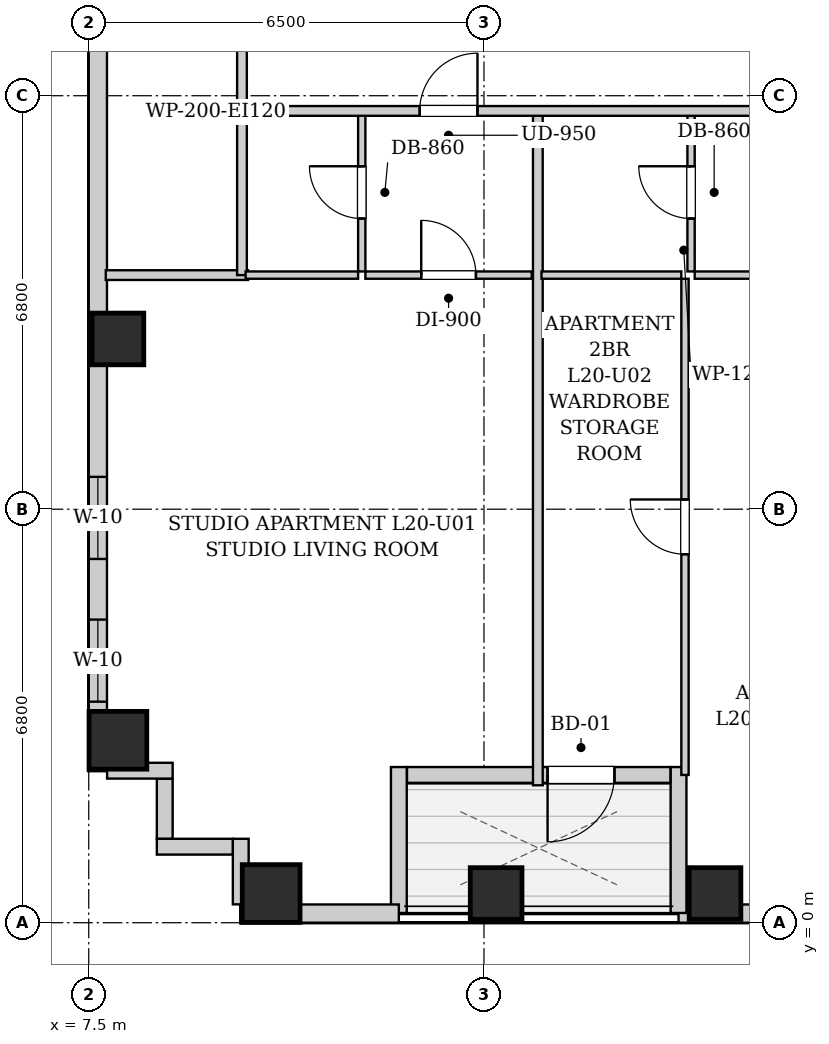
"""IFC4 building model, lengths in metres.
Left out: names, types, materials, properties, quantities, classifications, styles, units other than length and angle.
Written with IfcOpenShell. Run it as: python <this file> out.ifc"""

import sys

from ifc_helpers import new_model, si_unit, direction, frame, frame_2d, origin, origin_2d, place, context, subcontext, project, spatial, rectangle, extrude, element, fill, save


model = new_model("IFC4")
c1 = context("Model", 3, precision=1e-05, world=origin(), true_north=direction((0.0, 1.0)))
c2 = subcontext(c1, "Body", "Model", "MODEL_VIEW")
j1 = project(units=[si_unit("LENGTHUNIT", "METRE"), si_unit("PLANEANGLEUNIT", "RADIAN")], contexts=[c1])
p1 = place(None, origin())
s1 = spatial("IfcSite", under=j1, at=p1, CompositionType="ELEMENT")
p2 = place(p1, origin())
s2 = spatial("IfcBuilding", under=s1, at=p2, CompositionType="ELEMENT")
p3 = place(p2, frame((0.0, 0.0, 75.1)))
s3 = spatial("IfcBuildingStorey", under=s2, at=p3, CompositionType="ELEMENT", Elevation=75.1)
p4 = place(p3, frame((10.5, 0.48, 0.0), z_axis=(0.0, 0.0, 1.0), x_axis=(1.0, 0.0, 0.0)))
e1 = element("IfcColumn", 1, at=p4, inside=s3, PredefinedType="COLUMN", context=c2, shape_type="SweptSolid", body=[
    extrude(rectangle(XDim=0.95, YDim=0.95, at=origin_2d()), origin(), (0.0, 0.0, 1.0), 3.2),
])
for number, where, z_axis, x_axis in (
    (2, (14.2, 0.48, 0.0), (0.0, 0.0, 1.0), (1.0, 0.0, 0.0)),
    (3, (17.8, 0.48, 0.0), (0.0, 0.0, 1.0), (1.0, 0.0, 0.0)),
):
    element("IfcColumn", number, at=place(p3, frame(where, z_axis=z_axis, x_axis=x_axis)), inside=s3, PredefinedType="COLUMN", context=c2, shape_type="SweptSolid", body=[
        extrude(rectangle(XDim=0.85, YDim=0.85, at=origin_2d()), origin(), (0.0, 0.0, 1.0), 3.2),
    ])
p5 = place(p3, frame((7.98, 3.0, 0.0), z_axis=(0.0, 0.0, 1.0), x_axis=(1.0, 0.0, 0.0)))
e4 = element("IfcColumn", 4, at=p5, inside=s3, PredefinedType="COLUMN", context=c2, shape_type="SweptSolid", body=[
    extrude(rectangle(XDim=0.95, YDim=0.95, at=origin_2d()), origin(), (0.0, 0.0, 1.0), 3.2),
])
p6 = place(p3, frame((7.98, 9.6, 0.0), z_axis=(0.0, 0.0, 1.0), x_axis=(1.0, 0.0, 0.0)))
e5 = element("IfcColumn", 5, at=p6, inside=s3, PredefinedType="COLUMN", context=c2, shape_type="SweptSolid", body=[
    extrude(rectangle(XDim=0.85, YDim=0.85, at=origin_2d()), origin(), (0.0, 0.0, 1.0), 3.2),
])
p7 = place(p3, frame((40.9, 0.15, 0.0), z_axis=(0.0, 0.0, 1.0), x_axis=(-1.0, 0.0, 0.0)))
e6 = element("IfcWall", 6, at=p7, inside=s3, PredefinedType="SOLIDWALL", context=c2, shape_type="SweptSolid", body=[
    extrude(rectangle(XDim=23.7, YDim=0.3, at=frame_2d((11.85, 0.0))), origin(), (0.0, 0.0, 1.0), 2.94),
])
p8 = place(p7, frame((20.625, 0.0, 0.55)))
e7 = element("IfcOpeningElement", 7, at=p8, cuts=e6, PredefinedType="OPENING", context=c2, shape_type="SweptSolid", body=[
    extrude(rectangle(XDim=1.35, YDim=1.2, at=frame_2d((0.675, 0.6))), frame((0.0, 0.16, 0.0), z_axis=(0.0, -1.0, 0.0), x_axis=(1.0, 0.0, 0.0)), (0.0, 0.0, 1.0), 0.32),
])
p9 = place(p7, frame((12.55, 0.0, 0.55)))
e8 = element("IfcOpeningElement", 8, at=p9, cuts=e6, PredefinedType="OPENING", context=c2, shape_type="SweptSolid", body=[
    extrude(rectangle(XDim=0.85, YDim=1.2, at=frame_2d((0.425, 0.6))), frame((0.0, 0.16, 0.0), z_axis=(0.0, -1.0, 0.0), x_axis=(1.0, 0.0, 0.0)), (0.0, 0.0, 1.0), 0.32),
])
p10 = place(p7, frame((9.6, 0.0, 0.55)))
e9 = element("IfcOpeningElement", 9, at=p10, cuts=e6, PredefinedType="OPENING", context=c2, shape_type="SweptSolid", body=[
    extrude(rectangle(XDim=1.35, YDim=1.2, at=frame_2d((0.675, 0.6))), frame((0.0, 0.16, 0.0), z_axis=(0.0, -1.0, 0.0), x_axis=(1.0, 0.0, 0.0)), (0.0, 0.0, 1.0), 0.32),
])
p11 = place(p7, frame((5.765, 0.0, 0.55)))
e10 = element("IfcOpeningElement", 10, at=p11, cuts=e6, PredefinedType="OPENING", context=c2, shape_type="SweptSolid", body=[
    extrude(rectangle(XDim=1.35, YDim=1.2, at=frame_2d((0.675, 0.6))), frame((0.0, 0.16, 0.0), z_axis=(0.0, -1.0, 0.0), x_axis=(1.0, 0.0, 0.0)), (0.0, 0.0, 1.0), 0.32),
])
p12 = place(p7, frame((2.1, 0.0, 0.55)))
e11 = element("IfcOpeningElement", 11, at=p12, cuts=e6, PredefinedType="OPENING", context=c2, shape_type="SweptSolid", body=[
    extrude(rectangle(XDim=1.35, YDim=1.2, at=frame_2d((0.675, 0.6))), frame((0.0, 0.16, 0.0), z_axis=(0.0, -1.0, 0.0), x_axis=(1.0, 0.0, 0.0)), (0.0, 0.0, 1.0), 0.32),
])
p13 = place(p3, frame((17.2, 0.16, 0.0), z_axis=(0.0, 0.0, 1.0), x_axis=(0.0, 1.0, 0.0)))
e12 = element("IfcWall", 12, at=p13, inside=s3, PredefinedType="SOLIDWALL", context=c2, shape_type="SweptSolid", body=[
    extrude(rectangle(XDim=2.4, YDim=0.26, at=frame_2d((1.2, 0.0))), origin(), (0.0, 0.0, 1.0), 2.94),
])
p14 = place(p3, frame((17.066, 2.43, 0.0), z_axis=(0.0, 0.0, 1.0), x_axis=(-1.0, 0.0, 0.0)))
e13 = element("IfcWall", 13, at=p14, inside=s3, PredefinedType="SOLIDWALL", context=c2, shape_type="SweptSolid", body=[
    extrude(rectangle(XDim=4.332, YDim=0.26, at=frame_2d((2.166, 0.0))), origin(), (0.0, 0.0, 1.0), 2.94),
])
p15 = place(p14, frame((0.92, 0.0, 0.0)))
e14 = element("IfcOpeningElement", 14, at=p15, cuts=e13, PredefinedType="OPENING", context=c2, shape_type="SweptSolid", body=[
    extrude(rectangle(XDim=1.1, YDim=2.0, at=frame_2d((0.55, 1.0))), frame((0.0, 0.14, 0.0), z_axis=(0.0, -1.0, 0.0), x_axis=(1.0, 0.0, 0.0)), (0.0, 0.0, 1.0), 0.28),
])
p16 = place(p3, frame((12.6, 2.56, 0.0), z_axis=(0.0, 0.0, 1.0), x_axis=(0.0, -1.0, 0.0)))
e15 = element("IfcWall", 15, at=p16, inside=s3, PredefinedType="SOLIDWALL", context=c2, shape_type="SweptSolid", body=[
    extrude(rectangle(XDim=2.4, YDim=0.26, at=frame_2d((1.2, 0.0))), origin(), (0.0, 0.0, 1.0), 2.94),
])
p17 = place(p3, frame((12.6, 0.15, 0.0), z_axis=(0.0, 0.0, 1.0), x_axis=(-1.0, 0.0, 0.0)))
e16 = element("IfcWall", 16, at=p17, inside=s3, PredefinedType="SOLIDWALL", context=c2, shape_type="SweptSolid", body=[
    extrude(rectangle(XDim=2.6, YDim=0.3, at=frame_2d((1.3, 0.0))), origin(), (0.0, 0.0, 1.0), 2.94),
])
p18 = place(p3, frame((7.65, 2.5, 0.0), z_axis=(0.0, 0.0, 1.0), x_axis=(0.0, 1.0, 0.0)))
e17 = element("IfcWall", 17, at=p18, inside=s3, PredefinedType="SOLIDWALL", context=c2, shape_type="SweptSolid", body=[
    extrude(rectangle(XDim=12.7, YDim=0.3, at=frame_2d((6.35, 0.0))), origin(), (0.0, 0.0, 1.0), 2.94),
])
p19 = place(p18, frame((3.482, 0.0, 0.55)))
e18 = element("IfcOpeningElement", 18, at=p19, cuts=e17, PredefinedType="OPENING", context=c2, shape_type="SweptSolid", body=[
    extrude(rectangle(XDim=1.35, YDim=1.2, at=frame_2d((0.675, 0.6))), frame((0.0, 0.16, 0.0), z_axis=(0.0, -1.0, 0.0), x_axis=(1.0, 0.0, 0.0)), (0.0, 0.0, 1.0), 0.32),
])
p20 = place(p18, frame((1.135, 0.0, 0.55)))
e19 = element("IfcOpeningElement", 19, at=p20, cuts=e17, PredefinedType="OPENING", context=c2, shape_type="SweptSolid", body=[
    extrude(rectangle(XDim=1.35, YDim=1.2, at=frame_2d((0.675, 0.6))), frame((0.0, 0.16, 0.0), z_axis=(0.0, -1.0, 0.0), x_axis=(1.0, 0.0, 0.0)), (0.0, 0.0, 1.0), 0.32),
])
p21 = place(p3, frame((10.0, 0.302, 0.0), z_axis=(0.0, 0.0, 1.0), x_axis=(0.0, 1.0, 0.0)))
e20 = element("IfcWall", 20, at=p21, inside=s3, PredefinedType="SOLIDWALL", context=c2, shape_type="SweptSolid", body=[
    extrude(rectangle(XDim=1.078, YDim=0.26, at=frame_2d((0.539, 0.0))), origin(), (0.0, 0.0, 1.0), 2.94),
])
p22 = place(p3, frame((9.868, 1.25, 0.0), z_axis=(0.0, 0.0, 1.0), x_axis=(-1.0, 0.0, 0.0)))
e21 = element("IfcWall", 21, at=p22, inside=s3, PredefinedType="SOLIDWALL", context=c2, shape_type="SweptSolid", body=[
    extrude(rectangle(XDim=1.248, YDim=0.26, at=frame_2d((0.624, 0.0))), origin(), (0.0, 0.0, 1.0), 2.94),
])
p23 = place(p3, frame((8.75, 1.382, 0.0), z_axis=(0.0, 0.0, 1.0), x_axis=(0.0, 1.0, 0.0)))
e22 = element("IfcWall", 22, at=p23, inside=s3, PredefinedType="SOLIDWALL", context=c2, shape_type="SweptSolid", body=[
    extrude(rectangle(XDim=0.986, YDim=0.26, at=frame_2d((0.493, 0.0))), origin(), (0.0, 0.0, 1.0), 2.94),
])
p24 = place(p3, frame((8.88, 2.5, 0.0), z_axis=(0.0, 0.0, 1.0), x_axis=(-1.0, 0.0, 0.0)))
e23 = element("IfcWall", 23, at=p24, inside=s3, PredefinedType="SOLIDWALL", context=c2, shape_type="SweptSolid", body=[
    extrude(rectangle(XDim=1.078, YDim=0.26, at=frame_2d((0.539, 0.0))), origin(), (0.0, 0.0, 1.0), 2.94),
])
p25 = place(p3, frame((10.02, 13.35, 0.0), z_axis=(0.0, 0.0, 1.0), x_axis=(0.0, 1.0, 0.0)))
e24 = element("IfcWall", 24, at=p25, inside=s3, PredefinedType="PARTITIONING", context=c2, shape_type="SweptSolid", body=[
    extrude(rectangle(XDim=1.74, YDim=0.16, at=frame_2d((0.87, 0.0))), origin(), (0.0, 0.0, 1.0), 2.94),
])
p26 = place(p3, frame((7.78, 10.65, 0.0), z_axis=(0.0, 0.0, 1.0), x_axis=(1.0, 0.0, 0.0)))
e25 = element("IfcWall", 25, at=p26, inside=s3, PredefinedType="PARTITIONING", context=c2, shape_type="SweptSolid", body=[
    extrude(rectangle(XDim=2.34, YDim=0.16, at=frame_2d((1.17, 0.0))), origin(), (0.0, 0.0, 1.0), 2.94),
])
p27 = place(p3, frame((10.02, 10.65, 0.0), z_axis=(0.0, 0.0, 1.0), x_axis=(0.0, 1.0, 0.0)))
e26 = element("IfcWall", 26, at=p27, inside=s3, PredefinedType="PARTITIONING", context=c2, shape_type="SweptSolid", body=[
    extrude(rectangle(XDim=2.66, YDim=0.16, at=frame_2d((1.33, 0.0))), origin(), (0.0, 0.0, 1.0), 2.94),
])
p28 = place(p3, frame((11.99, 10.71, 0.0), z_axis=(0.0, 0.0, 1.0), x_axis=(0.0, 1.0, 0.0)))
e27 = element("IfcWall", 27, at=p28, inside=s3, PredefinedType="PARTITIONING", context=c2, shape_type="SweptSolid", body=[
    extrude(rectangle(XDim=2.6, YDim=0.12, at=frame_2d((1.3, 0.0))), origin(), (0.0, 0.0, 1.0), 2.94),
])
p29 = place(p28, frame((0.87, 0.0, 0.0)))
e28 = element("IfcOpeningElement", 28, at=p29, cuts=e27, PredefinedType="OPENING", context=c2, shape_type="SweptSolid", body=[
    extrude(rectangle(XDim=0.86, YDim=2.05, at=frame_2d((0.43, 1.025))), frame((0.0, 0.07, 0.0), z_axis=(0.0, -1.0, 0.0), x_axis=(1.0, 0.0, 0.0)), (0.0, 0.0, 1.0), 0.14),
])
p30 = place(p3, frame((10.08, 10.65, 0.0), z_axis=(0.0, 0.0, 1.0), x_axis=(1.0, 0.0, 0.0)))
e29 = element("IfcWall", 29, at=p30, inside=s3, PredefinedType="PARTITIONING", context=c2, shape_type="SweptSolid", body=[
    extrude(rectangle(XDim=1.85, YDim=0.12, at=frame_2d((0.925, 0.0))), origin(), (0.0, 0.0, 1.0), 2.94),
])
p31 = place(p3, frame((12.05, 10.65, 0.0), z_axis=(0.0, 0.0, 1.0), x_axis=(1.0, 0.0, 0.0)))
e30 = element("IfcWall", 30, at=p31, inside=s3, PredefinedType="PARTITIONING", context=c2, shape_type="SweptSolid", body=[
    extrude(rectangle(XDim=2.736, YDim=0.12, at=frame_2d((1.368, 0.0))), origin(), (0.0, 0.0, 1.0), 2.94),
])
p32 = place(p31, frame((0.918, 0.0, 0.0)))
e31 = element("IfcOpeningElement", 31, at=p32, cuts=e30, PredefinedType="OPENING", context=c2, shape_type="SweptSolid", body=[
    extrude(rectangle(XDim=0.9, YDim=2.05, at=frame_2d((0.45, 1.025))), frame((0.0, 0.07, 0.0), z_axis=(0.0, -1.0, 0.0), x_axis=(1.0, 0.0, 0.0)), (0.0, 0.0, 1.0), 0.14),
])
p33 = place(p3, frame((14.886, 2.26, 0.0), z_axis=(0.0, 0.0, 1.0), x_axis=(0.0, 1.0, 0.0)))
e32 = element("IfcWall", 32, at=p33, inside=s3, PredefinedType="PARTITIONING", context=c2, shape_type="SweptSolid", body=[
    extrude(rectangle(XDim=11.05, YDim=0.16, at=frame_2d((5.525, 0.0))), origin(), (0.0, 0.0, 1.0), 2.94),
])
p34 = place(p3, frame((17.406, 10.71, 0.0), z_axis=(0.0, 0.0, 1.0), x_axis=(0.0, 1.0, 0.0)))
e33 = element("IfcWall", 33, at=p34, inside=s3, PredefinedType="PARTITIONING", context=c2, shape_type="SweptSolid", body=[
    extrude(rectangle(XDim=2.6, YDim=0.12, at=frame_2d((1.3, 0.0))), origin(), (0.0, 0.0, 1.0), 2.94),
])
p35 = place(p34, frame((0.87, 0.0, 0.0)))
e34 = element("IfcOpeningElement", 34, at=p35, cuts=e33, PredefinedType="OPENING", context=c2, shape_type="SweptSolid", body=[
    extrude(rectangle(XDim=0.86, YDim=2.05, at=frame_2d((0.43, 1.025))), frame((0.0, 0.07, 0.0), z_axis=(0.0, -1.0, 0.0), x_axis=(1.0, 0.0, 0.0)), (0.0, 0.0, 1.0), 0.14),
])
p36 = place(p3, frame((14.946, 10.65, 0.0), z_axis=(0.0, 0.0, 1.0), x_axis=(1.0, 0.0, 0.0)))
e35 = element("IfcWall", 35, at=p36, inside=s3, PredefinedType="PARTITIONING", context=c2, shape_type="SweptSolid", body=[
    extrude(rectangle(XDim=2.3, YDim=0.12, at=frame_2d((1.15, 0.0))), origin(), (0.0, 0.0, 1.0), 2.94),
])
p37 = place(p3, frame((17.466, 10.65, 0.0), z_axis=(0.0, 0.0, 1.0), x_axis=(1.0, 0.0, 0.0)))
e36 = element("IfcWall", 36, at=p37, inside=s3, PredefinedType="PARTITIONING", context=c2, shape_type="SweptSolid", body=[
    extrude(rectangle(XDim=4.28, YDim=0.12, at=frame_2d((2.14, 0.0))), origin(), (0.0, 0.0, 1.0), 2.94),
])
p38 = place(p37, frame((1.69, 0.0, 0.0)))
e37 = element("IfcOpeningElement", 37, at=p38, cuts=e36, PredefinedType="OPENING", context=c2, shape_type="SweptSolid", body=[
    extrude(rectangle(XDim=0.9, YDim=2.05, at=frame_2d((0.45, 1.025))), frame((0.0, 0.07, 0.0), z_axis=(0.0, -1.0, 0.0), x_axis=(1.0, 0.0, 0.0)), (0.0, 0.0, 1.0), 0.14),
])
p39 = place(p3, frame((17.306, 2.43, 0.0), z_axis=(0.0, 0.0, 1.0), x_axis=(0.0, 1.0, 0.0)))
e38 = element("IfcWall", 38, at=p39, inside=s3, PredefinedType="PARTITIONING", context=c2, shape_type="SweptSolid", body=[
    extrude(rectangle(XDim=8.16, YDim=0.12, at=frame_2d((4.08, 0.0))), origin(), (0.0, 0.0, 1.0), 2.94),
])
p40 = place(p39, frame((3.63, 0.0, 0.0)))
e39 = element("IfcOpeningElement", 39, at=p40, cuts=e38, PredefinedType="OPENING", context=c2, shape_type="SweptSolid", body=[
    extrude(rectangle(XDim=0.9, YDim=2.05, at=frame_2d((0.45, 1.025))), frame((0.0, 0.07, 0.0), z_axis=(0.0, -1.0, 0.0), x_axis=(1.0, 0.0, 0.0)), (0.0, 0.0, 1.0), 0.14),
])
p41 = place(p3, frame((10.05, 13.35, 0.0), z_axis=(0.0, 0.0, 1.0), x_axis=(1.0, 0.0, 0.0)))
e40 = element("IfcWall", 40, at=p41, inside=s3, PredefinedType="PARTITIONING", context=c2, shape_type="SweptSolid", body=[
    extrude(rectangle(XDim=30.8, YDim=0.16, at=frame_2d((15.4, 0.0))), origin(), (0.0, 0.0, 1.0), 2.94),
])
p42 = place(p41, frame((2.893, 0.0, 0.0)))
e41 = element("IfcOpeningElement", 41, at=p42, cuts=e40, PredefinedType="OPENING", context=c2, shape_type="SweptSolid", body=[
    extrude(rectangle(XDim=0.95, YDim=2.1, at=frame_2d((0.475, 1.05))), frame((0.0, 0.09, 0.0), z_axis=(0.0, -1.0, 0.0), x_axis=(1.0, 0.0, 0.0)), (0.0, 0.0, 1.0), 0.18),
])
p43 = place(p41, frame((9.161, 0.0, 0.0)))
e42 = element("IfcOpeningElement", 42, at=p43, cuts=e40, PredefinedType="OPENING", context=c2, shape_type="SweptSolid", body=[
    extrude(rectangle(XDim=0.95, YDim=2.1, at=frame_2d((0.475, 1.05))), frame((0.0, 0.09, 0.0), z_axis=(0.0, -1.0, 0.0), x_axis=(1.0, 0.0, 0.0)), (0.0, 0.0, 1.0), 0.18),
])
p44 = place(p41, frame((26.306, 0.0, 0.0)))
e43 = element("IfcOpeningElement", 43, at=p44, cuts=e40, PredefinedType="OPENING", context=c2, shape_type="SweptSolid", body=[
    extrude(rectangle(XDim=0.95, YDim=2.1, at=frame_2d((0.475, 1.05))), frame((0.0, 0.09, 0.0), z_axis=(0.0, -1.0, 0.0), x_axis=(1.0, 0.0, 0.0)), (0.0, 0.0, 1.0), 0.18),
])
p45 = place(p29, origin())
e44 = element("IfcDoor", 44, at=p45, inside=s3, OperationType="SINGLE_SWING_RIGHT", PredefinedType="DOOR", context=c2, shape_type="SweptSolid", body=[
    extrude(rectangle(XDim=0.86, YDim=2.05, at=frame_2d((0.43, 1.025))), frame((0.0, 0.025, 0.0), z_axis=(0.0, -1.0, 0.0), x_axis=(1.0, 0.0, 0.0)), (0.0, 0.0, 1.0), 0.05),
])
fill(e28, e44)
p46 = place(p32, origin())
e45 = element("IfcDoor", 45, at=p46, inside=s3, OperationType="SINGLE_SWING_LEFT", PredefinedType="DOOR", context=c2, shape_type="SweptSolid", body=[
    extrude(rectangle(XDim=0.9, YDim=2.05, at=frame_2d((0.45, 1.025))), frame((0.0, 0.025, 0.0), z_axis=(0.0, -1.0, 0.0), x_axis=(1.0, 0.0, 0.0)), (0.0, 0.0, 1.0), 0.05),
])
fill(e31, e45)
p47 = place(p35, origin())
e46 = element("IfcDoor", 46, at=p47, inside=s3, OperationType="SINGLE_SWING_RIGHT", PredefinedType="DOOR", context=c2, shape_type="SweptSolid", body=[
    extrude(rectangle(XDim=0.86, YDim=2.05, at=frame_2d((0.43, 1.025))), frame((0.0, 0.025, 0.0), z_axis=(0.0, -1.0, 0.0), x_axis=(1.0, 0.0, 0.0)), (0.0, 0.0, 1.0), 0.05),
])
fill(e34, e46)
p48 = place(p40, origin())
e47 = element("IfcDoor", 47, at=p48, inside=s3, OperationType="SINGLE_SWING_RIGHT", PredefinedType="DOOR", context=c2, shape_type="SweptSolid", body=[
    extrude(rectangle(XDim=0.9, YDim=2.05, at=frame_2d((0.45, 1.025))), frame((0.0, 0.025, 0.0), z_axis=(0.0, -1.0, 0.0), x_axis=(1.0, 0.0, 0.0)), (0.0, 0.0, 1.0), 0.05),
])
fill(e39, e47)
p49 = place(p42, origin())
e48 = element("IfcDoor", 48, at=p49, inside=s3, OperationType="SINGLE_SWING_RIGHT", PredefinedType="DOOR", context=c2, shape_type="SweptSolid", body=[
    extrude(rectangle(XDim=0.95, YDim=2.1, at=frame_2d((0.475, 1.05))), frame((0.0, 0.025, 0.0), z_axis=(0.0, -1.0, 0.0), x_axis=(1.0, 0.0, 0.0)), (0.0, 0.0, 1.0), 0.05),
])
fill(e41, e48)
p50 = place(p15, origin())
e49 = element("IfcDoor", 49, at=p50, inside=s3, OperationType="SINGLE_SWING_RIGHT", PredefinedType="DOOR", context=c2, shape_type="SweptSolid", body=[
    extrude(rectangle(XDim=1.1, YDim=2.0, at=frame_2d((0.55, 1.0))), frame((0.0, 0.025, 0.0), z_axis=(0.0, -1.0, 0.0), x_axis=(1.0, 0.0, 0.0)), (0.0, 0.0, 1.0), 0.05),
])
fill(e14, e49)
p51 = place(p19, origin())
e50 = element("IfcWindow", 50, at=p51, inside=s3, PartitioningType="SINGLE_PANEL", PredefinedType="WINDOW", context=c2, shape_type="SweptSolid", body=[
    extrude(rectangle(XDim=1.35, YDim=1.2, at=frame_2d((0.675, 0.6))), frame((0.0, 0.03, 0.0), z_axis=(0.0, -1.0, 0.0), x_axis=(1.0, 0.0, 0.0)), (0.0, 0.0, 1.0), 0.06),
])
fill(e18, e50)
p52 = place(p20, origin())
e51 = element("IfcWindow", 51, at=p52, inside=s3, PartitioningType="SINGLE_PANEL", PredefinedType="WINDOW", context=c2, shape_type="SweptSolid", body=[
    extrude(rectangle(XDim=1.35, YDim=1.2, at=frame_2d((0.675, 0.6))), frame((0.0, 0.03, 0.0), z_axis=(0.0, -1.0, 0.0), x_axis=(1.0, 0.0, 0.0)), (0.0, 0.0, 1.0), 0.06),
])
fill(e19, e51)
save(model, sys.argv[1])
